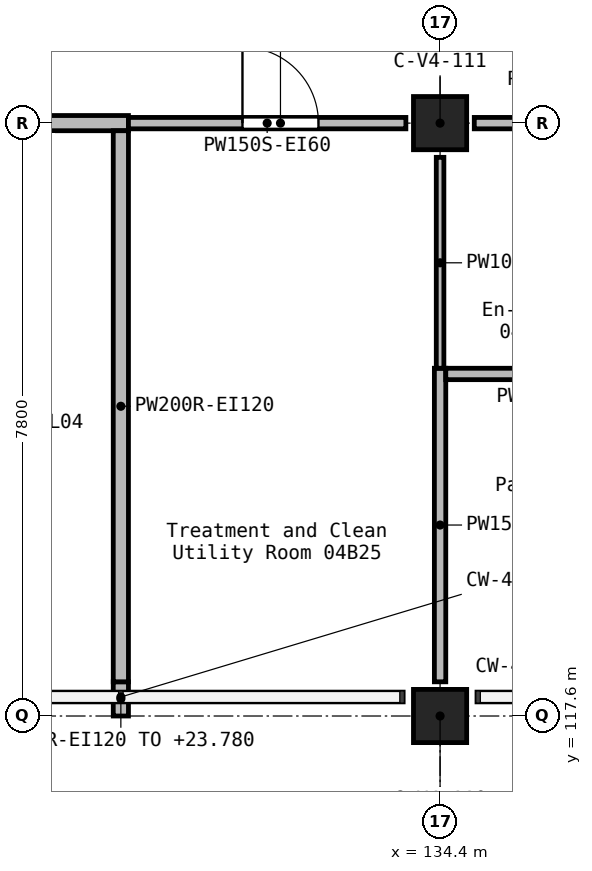
"""IFC4 building model, lengths in metres.
Left out: names, types, materials, properties, quantities, classifications, styles, units other than length and angle.
Written with IfcOpenShell. Run it as: python <this file> out.ifc"""

import sys

from ifc_helpers import new_model, si_unit, direction, frame, frame_2d, origin, origin_2d, place, context, subcontext, project, spatial, rectangle, extrude, element, fill, save


model = new_model("IFC4")
c1 = context("Model", 3, precision=1e-05, world=origin(), true_north=direction((0.0, 1.0)))
c2 = subcontext(c1, "Body", "Model", "MODEL_VIEW")
j1 = project(units=[si_unit("LENGTHUNIT", "METRE"), si_unit("PLANEANGLEUNIT", "RADIAN")], contexts=[c1])
p1 = place(None, origin())
s1 = spatial("IfcSite", under=j1, at=p1, CompositionType="ELEMENT")
p2 = place(p1, origin())
s2 = spatial("IfcBuilding", under=s1, at=p2, CompositionType="ELEMENT")
p3 = place(p2, frame((0.0, 0.0, 21.0)))
s3 = spatial("IfcBuildingStorey", under=s2, at=p3, CompositionType="ELEMENT", Elevation=21.0)
for number, where, z_axis, x_axis in (
    (1, (134.4, 117.6, 0.0), (0.0, 0.0, 1.0), (1.0, 0.0, 0.0)),
    (2, (134.4, 125.4, 0.0), (0.0, 0.0, 1.0), (1.0, 0.0, 0.0)),
):
    element("IfcColumn", number, at=place(p3, frame(where, z_axis=z_axis, x_axis=x_axis)), inside=s3, PredefinedType="COLUMN", context=c2, shape_type="SweptSolid", body=[
        extrude(rectangle(XDim=0.7, YDim=0.7, at=origin_2d()), origin(), (0.0, 0.0, 1.0), 3.9),
    ])
p4 = place(p3, frame((126.45, 125.4, 0.0), z_axis=(0.0, 0.0, 1.0), x_axis=(1.0, 0.0, 0.0)))
e3 = element("IfcWall", 3, at=p4, inside=s3, PredefinedType="SOLIDWALL", context=c2, shape_type="SweptSolid", body=[
    extrude(rectangle(XDim=3.85, YDim=0.2, at=frame_2d((1.925, 0.0))), origin(), (0.0, 0.0, 1.0), 3.6),
])
p5 = place(p4, frame((1.15, 0.0, 0.0)))
e4 = element("IfcOpeningElement", 4, at=p5, cuts=e3, PredefinedType="OPENING", context=c2, shape_type="SweptSolid", body=[
    extrude(rectangle(XDim=1.0, YDim=2.1, at=frame_2d((0.5, 1.05))), frame((0.0, 0.11, 0.0), z_axis=(0.0, -1.0, 0.0), x_axis=(1.0, 0.0, 0.0)), (0.0, 0.0, 1.0), 0.22),
])
p6 = place(p3, frame((130.2, 117.6, 0.0), z_axis=(0.0, 0.0, 1.0), x_axis=(0.0, 1.0, 0.0)))
e5 = element("IfcWall", 5, at=p6, inside=s3, PredefinedType="SOLIDWALL", context=c2, shape_type="SweptSolid", body=[
    extrude(rectangle(XDim=0.45, YDim=0.2, at=frame_2d((0.225, 0.0))), origin(), (0.0, 0.0, 1.0), 2.78),
])
p7 = place(p3, frame((130.2, 118.05, 0.0), z_axis=(0.0, 0.0, 1.0), x_axis=(0.0, 1.0, 0.0)))
e6 = element("IfcWall", 6, at=p7, inside=s3, PredefinedType="SOLIDWALL", context=c2, shape_type="SweptSolid", body=[
    extrude(rectangle(XDim=7.25, YDim=0.2, at=frame_2d((3.625, 0.0))), origin(), (0.0, 0.0, 1.0), 3.6),
])
p8 = place(p3, frame((130.3, 125.4, 0.0), z_axis=(0.0, 0.0, 1.0), x_axis=(1.0, 0.0, 0.0)))
e7 = element("IfcWall", 7, at=p8, inside=s3, PredefinedType="PARTITIONING", context=c2, shape_type="SweptSolid", body=[
    extrude(rectangle(XDim=3.65, YDim=0.15, at=frame_2d((1.825, 0.0))), origin(), (0.0, 0.0, 1.0), 3.6),
])
p9 = place(p8, frame((1.5, 0.0, 0.0)))
e8 = element("IfcOpeningElement", 8, at=p9, cuts=e7, PredefinedType="OPENING", context=c2, shape_type="SweptSolid", body=[
    extrude(rectangle(XDim=1.0, YDim=2.1, at=frame_2d((0.5, 1.05))), frame((0.0, 0.085, 0.0), z_axis=(0.0, -1.0, 0.0), x_axis=(1.0, 0.0, 0.0)), (0.0, 0.0, 1.0), 0.17),
])
p10 = place(p3, frame((134.85, 125.4, 0.0), z_axis=(0.0, 0.0, 1.0), x_axis=(1.0, 0.0, 0.0)))
e9 = element("IfcWall", 9, at=p10, inside=s3, PredefinedType="PARTITIONING", context=c2, shape_type="SweptSolid", body=[
    extrude(rectangle(XDim=3.675, YDim=0.15, at=frame_2d((1.837, 0.0))), origin(), (0.0, 0.0, 1.0), 3.6),
])
p11 = place(p10, frame((2.35, 0.0, 0.0)))
e10 = element("IfcOpeningElement", 10, at=p11, cuts=e9, PredefinedType="OPENING", context=c2, shape_type="SweptSolid", body=[
    extrude(rectangle(XDim=1.0, YDim=2.1, at=frame_2d((0.5, 1.05))), frame((0.0, 0.085, 0.0), z_axis=(0.0, -1.0, 0.0), x_axis=(1.0, 0.0, 0.0)), (0.0, 0.0, 1.0), 0.17),
])
p12 = place(p3, frame((134.4, 118.05, 0.0), z_axis=(0.0, 0.0, 1.0), x_axis=(0.0, 1.0, 0.0)))
e11 = element("IfcWall", 11, at=p12, inside=s3, PredefinedType="PARTITIONING", context=c2, shape_type="SweptSolid", body=[
    extrude(rectangle(XDim=4.125, YDim=0.15, at=frame_2d((2.062, 0.0))), origin(), (0.0, 0.0, 1.0), 3.6),
])
p13 = place(p3, frame((134.475, 122.1, 0.0), z_axis=(0.0, 0.0, 1.0), x_axis=(1.0, 0.0, 0.0)))
e12 = element("IfcWall", 12, at=p13, inside=s3, PredefinedType="PARTITIONING", context=c2, shape_type="SweptSolid", body=[
    extrude(rectangle(XDim=2.25, YDim=0.15, at=frame_2d((1.125, 0.0))), origin(), (0.0, 0.0, 1.0), 3.6),
])
p14 = place(p3, frame((134.4, 122.175, 0.0), z_axis=(0.0, 0.0, 1.0), x_axis=(0.0, 1.0, 0.0)))
e13 = element("IfcWall", 13, at=p14, inside=s3, PredefinedType="PARTITIONING", context=c2, shape_type="SweptSolid", body=[
    extrude(rectangle(XDim=2.775, YDim=0.1, at=frame_2d((1.387, 0.0))), origin(), (0.0, 0.0, 1.0), 3.6),
])
p15 = place(p9, frame((1.0, 0.0, 0.0), z_axis=(0.0, 0.0, 1.0), x_axis=(-1.0, 0.0, 0.0)))
e14 = element("IfcDoor", 14, at=p15, inside=s3, OperationType="SINGLE_SWING_LEFT", PredefinedType="DOOR", context=c2, shape_type="SweptSolid", body=[
    extrude(rectangle(XDim=1.0, YDim=2.1, at=frame_2d((0.5, 1.05))), frame((0.0, 0.025, 0.0), z_axis=(0.0, -1.0, 0.0), x_axis=(1.0, 0.0, 0.0)), (0.0, 0.0, 1.0), 0.05),
])
fill(e8, e14)
save(model, sys.argv[1])
